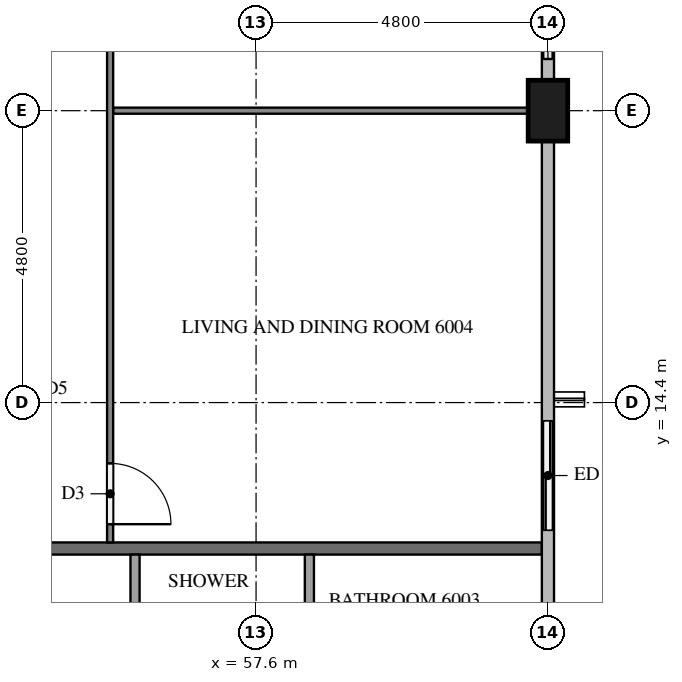
"""IFC4 building model, lengths in metres.
Left out: names, types, materials, properties, quantities, classifications, styles, units other than length and angle.
Written with IfcOpenShell. Run it as: python <this file> out.ifc"""

import sys

from ifc_helpers import new_model, si_unit, direction, frame, frame_2d, origin, origin_2d, place, context, subcontext, project, spatial, rectangle, extrude, element, fill, save


model = new_model("IFC4")
c1 = context("Model", 3, precision=1e-05, world=origin(), true_north=direction((0.0, 1.0)))
c2 = subcontext(c1, "Body", "Model", "MODEL_VIEW")
j1 = project(units=[si_unit("LENGTHUNIT", "METRE"), si_unit("PLANEANGLEUNIT", "RADIAN")], contexts=[c1])
p1 = place(None, origin())
s1 = spatial("IfcSite", under=j1, at=p1, CompositionType="ELEMENT")
p2 = place(p1, origin())
s2 = spatial("IfcBuilding", under=s1, at=p2, CompositionType="ELEMENT")
p3 = place(p2, frame((0.0, 0.0, 229.8)))
s3 = spatial("IfcBuildingStorey", under=s2, at=p3, CompositionType="ELEMENT", Elevation=229.8)
p4 = place(p3, frame((62.4, 19.2, 0.0), z_axis=(0.0, 0.0, 1.0), x_axis=(0.0, 1.0, 0.0)))
e1 = element("IfcColumn", 1, at=p4, inside=s3, PredefinedType="COLUMN", context=c2, shape_type="SweptSolid", body=[
    extrude(rectangle(XDim=1.0, YDim=0.65, at=origin_2d()), origin(), (0.0, 0.0, 1.0), 3.1),
])
p5 = place(p3, frame((62.4, 12.0, 0.0), z_axis=(0.0, 0.0, 1.0), x_axis=(0.0, 1.0, 0.0)))
e2 = element("IfcWall", 2, at=p5, inside=s3, PredefinedType="SOLIDWALL", context=c2, shape_type="SweptSolid", body=[
    extrude(rectangle(XDim=2.4, YDim=0.15, at=frame_2d((1.2, 0.0))), origin(), (0.0, 0.0, 1.0), 3.1),
])
p6 = place(p5, frame((0.3, 0.0, 0.0)))
e3 = element("IfcOpeningElement", 3, at=p6, cuts=e2, PredefinedType="OPENING", context=c2, shape_type="SweptSolid", body=[
    extrude(rectangle(XDim=1.8, YDim=2.4, at=frame_2d((0.9, 1.2))), frame((0.0, 0.085, 0.0), z_axis=(0.0, -1.0, 0.0), x_axis=(1.0, 0.0, 0.0)), (0.0, 0.0, 1.0), 0.17),
])
p7 = place(p3, frame((62.4, 19.7, 0.0), z_axis=(0.0, 0.0, 1.0), x_axis=(0.0, 1.0, 0.0)))
e4 = element("IfcWall", 4, at=p7, inside=s3, PredefinedType="SOLIDWALL", context=c2, shape_type="SweptSolid", body=[
    extrude(rectangle(XDim=1.9, YDim=0.15, at=frame_2d((0.95, 0.0))), origin(), (0.0, 0.0, 1.0), 3.1),
])
p8 = place(p7, frame((0.35, 0.0, 0.9)))
e5 = element("IfcOpeningElement", 5, at=p8, cuts=e4, PredefinedType="OPENING", context=c2, shape_type="SweptSolid", body=[
    extrude(rectangle(XDim=1.2, YDim=1.4, at=frame_2d((0.6, 0.7))), frame((0.0, 0.085, 0.0), z_axis=(0.0, -1.0, 0.0), x_axis=(1.0, 0.0, 0.0)), (0.0, 0.0, 1.0), 0.17),
])
p9 = place(p3, frame((50.5, 12.0, 0.0), z_axis=(0.0, 0.0, 1.0), x_axis=(1.0, 0.0, 0.0)))
e6 = element("IfcWall", 6, at=p9, inside=s3, PredefinedType="PARTITIONING", context=c2, shape_type="SweptSolid", body=[
    extrude(rectangle(XDim=11.8, YDim=0.2, at=frame_2d((5.9, 0.0))), origin(), (0.0, 0.0, 1.0), 3.1),
])
for number, where, z_axis, x_axis in (
    (7, (55.61, 11.9, 0.0), (0.0, 0.0, 1.0), (0.0, -1.0, 0.0)),
    (8, (58.477, 11.9, 0.0), (0.0, 0.0, 1.0), (0.0, -1.0, 0.0)),
):
    element("IfcWall", number, at=place(p3, frame(where, z_axis=z_axis, x_axis=x_axis)), inside=s3, PredefinedType="PARTITIONING", context=c2, shape_type="SweptSolid", body=[
        extrude(rectangle(XDim=2.075, YDim=0.15, at=frame_2d((1.038, 0.0))), origin(), (0.0, 0.0, 1.0), 3.1),
    ])
p10 = place(p3, frame((55.25, 19.2, 0.0), z_axis=(0.0, 0.0, 1.0), x_axis=(1.0, 0.0, 0.0)))
e9 = element("IfcWall", 9, at=p10, inside=s3, PredefinedType="PARTITIONING", context=c2, shape_type="SweptSolid", body=[
    extrude(rectangle(XDim=6.825, YDim=0.1, at=frame_2d((3.413, 0.0))), origin(), (0.0, 0.0, 1.0), 3.1),
])
p11 = place(p3, frame((55.2, 28.7, 0.0), z_axis=(0.0, 0.0, 1.0), x_axis=(0.0, -1.0, 0.0)))
e10 = element("IfcWall", 10, at=p11, inside=s3, PredefinedType="PARTITIONING", context=c2, shape_type="SweptSolid", body=[
    extrude(rectangle(XDim=16.6, YDim=0.1, at=frame_2d((8.3, 0.0))), origin(), (0.0, 0.0, 1.0), 3.1),
])
p12 = place(p11, frame((15.3, 0.0, 0.0)))
e11 = element("IfcOpeningElement", 11, at=p12, cuts=e10, PredefinedType="OPENING", context=c2, shape_type="SweptSolid", body=[
    extrude(rectangle(XDim=1.0, YDim=2.1, at=frame_2d((0.5, 1.05))), frame((0.0, 0.06, 0.0), z_axis=(0.0, -1.0, 0.0), x_axis=(1.0, 0.0, 0.0)), (0.0, 0.0, 1.0), 0.12),
])
p13 = place(p11, frame((5.05, 0.0, 0.0)))
e12 = element("IfcOpeningElement", 12, at=p13, cuts=e10, PredefinedType="OPENING", context=c2, shape_type="SweptSolid", body=[
    extrude(rectangle(XDim=0.9, YDim=2.1, at=frame_2d((0.45, 1.05))), frame((0.0, 0.06, 0.0), z_axis=(0.0, -1.0, 0.0), x_axis=(1.0, 0.0, 0.0)), (0.0, 0.0, 1.0), 0.12),
])
p14 = place(p11, frame((3.45, 0.0, 0.0)))
e13 = element("IfcOpeningElement", 13, at=p14, cuts=e10, PredefinedType="OPENING", context=c2, shape_type="SweptSolid", body=[
    extrude(rectangle(XDim=0.9, YDim=2.1, at=frame_2d((0.45, 1.05))), frame((0.0, 0.06, 0.0), z_axis=(0.0, -1.0, 0.0), x_axis=(1.0, 0.0, 0.0)), (0.0, 0.0, 1.0), 0.12),
])
p15 = place(p6, origin())
e14 = element("IfcDoor", 14, at=p15, inside=s3, OperationType="SLIDING_TO_RIGHT", PredefinedType="DOOR", context=c2, shape_type="SweptSolid", body=[
    extrude(rectangle(XDim=1.8, YDim=2.4, at=frame_2d((0.9, 1.2))), frame((0.0, 0.025, 0.0), z_axis=(0.0, -1.0, 0.0), x_axis=(1.0, 0.0, 0.0)), (0.0, 0.0, 1.0), 0.05),
])
fill(e3, e14)
p16 = place(p8, origin())
e15 = element("IfcWindow", 15, at=p16, inside=s3, PartitioningType="SINGLE_PANEL", PredefinedType="WINDOW", context=c2, shape_type="SweptSolid", body=[
    extrude(rectangle(XDim=1.2, YDim=1.4, at=frame_2d((0.6, 0.7))), frame((0.0, 0.03, 0.0), z_axis=(0.0, -1.0, 0.0), x_axis=(1.0, 0.0, 0.0)), (0.0, 0.0, 1.0), 0.06),
])
fill(e5, e15)
p17 = place(p12, origin())
e16 = element("IfcDoor", 16, at=p17, inside=s3, OperationType="SINGLE_SWING_RIGHT", PredefinedType="DOOR", context=c2, shape_type="SweptSolid", body=[
    extrude(rectangle(XDim=1.0, YDim=2.1, at=frame_2d((0.5, 1.05))), frame((0.0, 0.025, 0.0), z_axis=(0.0, -1.0, 0.0), x_axis=(1.0, 0.0, 0.0)), (0.0, 0.0, 1.0), 0.05),
])
fill(e11, e16)
save(model, sys.argv[1])
